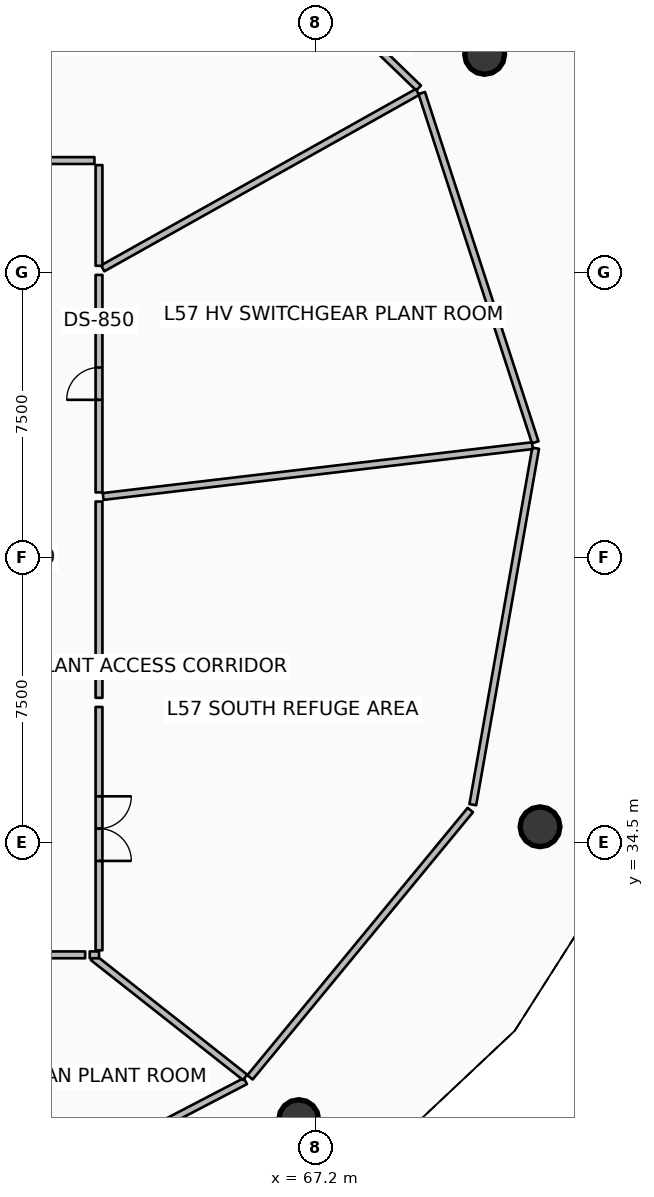
"""IFC4 building model, lengths in metres.
Left out: names, types, materials, properties, quantities, classifications, styles, units other than length and angle.
Written with IfcOpenShell. Run it as: python <this file> out.ifc"""

import sys

from ifc_helpers import new_model, si_unit, direction, frame, frame_2d, origin, origin_2d, place, context, subcontext, project, spatial, rectangle, circle, extrude, element, fill, save


model = new_model("IFC4")
c1 = context("Model", 3, precision=1e-05, world=origin(), true_north=direction((0.0, 1.0)))
c2 = subcontext(c1, "Body", "Model", "MODEL_VIEW")
j1 = project(units=[si_unit("LENGTHUNIT", "METRE"), si_unit("PLANEANGLEUNIT", "RADIAN")], contexts=[c1])
p1 = place(None, origin())
s1 = spatial("IfcSite", under=j1, at=p1, CompositionType="ELEMENT")
p2 = place(p1, origin())
s2 = spatial("IfcBuilding", under=s1, at=p2, CompositionType="ELEMENT")
p3 = place(p2, frame((0.0, 0.0, 225.3)))
s3 = spatial("IfcBuildingStorey", under=s2, at=p3, CompositionType="ELEMENT", Elevation=225.3)
for number, where, z_axis, x_axis in (
    (1, (71.648, 55.243, 0.0), (0.0, 0.0, 1.0), (1.0, 0.0, 0.0)),
    (2, (66.755, 27.215, 0.0), (0.0, 0.0, 1.0), (1.0, 0.0, 0.0)),
    (3, (73.105, 34.92, 0.0), (0.0, 0.0, 1.0), (1.0, 0.0, 0.0)),
):
    element("IfcColumn", number, at=place(p3, frame(where, z_axis=z_axis, x_axis=x_axis)), inside=s3, PredefinedType="COLUMN", context=c2, shape_type="SweptSolid", body=[
        extrude(circle(Radius=0.525, at=origin_2d()), origin(), (0.0, 0.0, 1.0), 6.28),
    ])
p4 = place(p3, frame((69.91, 54.358, 0.0), z_axis=(0.0, 0.0, 1.0), x_axis=(-0.719354198581, 0.694643460334, 0.0)))
e4 = element("IfcWall", 4, at=p4, inside=s3, PredefinedType="PARTITIONING", context=c2, shape_type="SweptSolid", body=[
    extrude(rectangle(XDim=9.524, YDim=0.18, at=frame_2d((4.762, 0.0))), origin(), (0.0, 0.0, 1.0), 2.304),
])
p5 = place(p3, frame((57.96, 24.379, 0.0), z_axis=(0.0, 0.0, 1.0), x_axis=(0.886953337161, 0.461859045271, 0.0)))
e5 = element("IfcWall", 5, at=p5, inside=s3, PredefinedType="PARTITIONING", context=c2, shape_type="SweptSolid", body=[
    extrude(rectangle(XDim=8.334, YDim=0.18, at=frame_2d((4.167, 0.0))), origin(), (0.0, 0.0, 1.0), 2.304),
])
p6 = place(p3, frame((65.474, 28.327, 0.0), z_axis=(0.0, 0.0, 1.0), x_axis=(0.636001991142, 0.771687415514, 0.0)))
e6 = element("IfcWall", 6, at=p6, inside=s3, PredefinedType="PARTITIONING", context=c2, shape_type="SweptSolid", body=[
    extrude(rectangle(XDim=9.115, YDim=0.18, at=frame_2d((4.558, 0.0))), origin(), (0.0, 0.0, 1.0), 2.304),
])
p7 = place(p3, frame((71.336, 35.501, 0.0), z_axis=(0.0, 0.0, 1.0), x_axis=(0.173669808034, 0.98480393875, 0.0)))
e7 = element("IfcWall", 7, at=p7, inside=s3, PredefinedType="PARTITIONING", context=c2, shape_type="SweptSolid", body=[
    extrude(rectangle(XDim=9.524, YDim=0.18, at=frame_2d((4.762, 0.0))), origin(), (0.0, 0.0, 1.0), 2.304),
])
p8 = place(p3, frame((72.979, 45.035, 0.0), z_axis=(0.0, 0.0, 1.0), x_axis=(-0.309041515545, 0.951048548534, 0.0)))
e8 = element("IfcWall", 8, at=p8, inside=s3, PredefinedType="PARTITIONING", context=c2, shape_type="SweptSolid", body=[
    extrude(rectangle(XDim=9.664, YDim=0.18, at=frame_2d((4.832, 0.0))), origin(), (0.0, 0.0, 1.0), 5.273),
])
p9 = place(p3, frame((56.306, 52.536, 0.0), z_axis=(0.0, 0.0, 1.0), x_axis=(0.619085632085, 0.785323487581, 0.0)))
e9 = element("IfcWall", 9, at=p9, inside=s3, PredefinedType="PARTITIONING", context=c2, shape_type="SweptSolid", body=[
    extrude(rectangle(XDim=10.715, YDim=0.18, at=frame_2d((5.357, 0.0))), origin(), (0.0, 0.0, 1.0), 2.304),
])
p10 = place(p3, frame((53.972, 31.55, 0.0), z_axis=(0.0, 0.0, 1.0), x_axis=(1.0, 0.0, 0.0)))
e10 = element("IfcWall", 10, at=p10, inside=s3, PredefinedType="PARTITIONING", context=c2, shape_type="SweptSolid", body=[
    extrude(rectangle(XDim=7.163, YDim=0.18, at=frame_2d((3.582, 0.0))), origin(), (0.0, 0.0, 1.0), 2.304),
])
p11 = place(p10, frame((3.057, 0.0, 0.0)))
e11 = element("IfcOpeningElement", 11, at=p11, cuts=e10, PredefinedType="OPENING", context=c2, shape_type="SweptSolid", body=[
    extrude(rectangle(XDim=1.05, YDim=2.1, at=frame_2d((0.525, 1.05))), frame((0.0, 0.1, 0.0), z_axis=(0.0, -1.0, 0.0), x_axis=(1.0, 0.0, 0.0)), (0.0, 0.0, 1.0), 0.2),
])
p12 = place(p3, frame((61.342, 31.482, 0.0), z_axis=(0.0, 0.0, 1.0), x_axis=(0.785303207868, -0.619111356471, 0.0)))
e12 = element("IfcWall", 12, at=p12, inside=s3, PredefinedType="PARTITIONING", context=c2, shape_type="SweptSolid", body=[
    extrude(rectangle(XDim=5.096, YDim=0.18, at=frame_2d((2.548, 0.0))), origin(), (0.0, 0.0, 1.0), 2.304),
])
p13 = place(p3, frame((61.256, 31.55, 0.0), z_axis=(0.0, 0.0, 1.0), x_axis=(1.0, 0.0, 0.0)))
e13 = element("IfcWall", 13, at=p13, inside=s3, PredefinedType="PARTITIONING", context=c2, shape_type="SweptSolid", body=[
    extrude(rectangle(XDim=0.244, YDim=0.18, at=frame_2d((0.122, 0.0))), origin(), (0.0, 0.0, 1.0), 2.304),
])
p14 = place(p3, frame((61.5, 31.67, 0.0), z_axis=(0.0, 0.0, 1.0), x_axis=(0.0, 1.0, 0.0)))
e14 = element("IfcWall", 14, at=p14, inside=s3, PredefinedType="PARTITIONING", context=c2, shape_type="SweptSolid", body=[
    extrude(rectangle(XDim=6.403, YDim=0.18, at=frame_2d((3.201, 0.0))), origin(), (0.0, 0.0, 1.0), 2.304),
])
p15 = place(p14, frame((2.351, 0.0, 0.0)))
e15 = element("IfcOpeningElement", 15, at=p15, cuts=e14, PredefinedType="OPENING", context=c2, shape_type="SweptSolid", body=[
    extrude(rectangle(XDim=1.7, YDim=2.15, at=frame_2d((0.85, 1.075))), frame((0.0, 0.1, 0.0), z_axis=(0.0, -1.0, 0.0), x_axis=(1.0, 0.0, 0.0)), (0.0, 0.0, 1.0), 0.2),
])
p16 = place(p3, frame((61.5, 38.312, 0.0), z_axis=(0.0, 0.0, 1.0), x_axis=(0.0, 1.0, 0.0)))
e16 = element("IfcWall", 16, at=p16, inside=s3, PredefinedType="PARTITIONING", context=c2, shape_type="SweptSolid", body=[
    extrude(rectangle(XDim=5.165, YDim=0.18, at=frame_2d((2.583, 0.0))), origin(), (0.0, 0.0, 1.0), 2.304),
])
p17 = place(p3, frame((61.609, 43.611, 0.0), z_axis=(0.0, 0.0, 1.0), x_axis=(0.993068014992, 0.117541131527, 0.0)))
e17 = element("IfcWall", 17, at=p17, inside=s3, PredefinedType="PARTITIONING", context=c2, shape_type="SweptSolid", body=[
    extrude(rectangle(XDim=11.374, YDim=0.18, at=frame_2d((5.687, 0.0))), origin(), (0.0, 0.0, 1.0), 5.273),
])
p18 = place(p3, frame((61.5, 43.718, 0.0), z_axis=(0.0, 0.0, 1.0), x_axis=(0.0, 1.0, 0.0)))
e18 = element("IfcWall", 18, at=p18, inside=s3, PredefinedType="PARTITIONING", context=c2, shape_type="SweptSolid", body=[
    extrude(rectangle(XDim=5.723, YDim=0.18, at=frame_2d((2.861, 0.0))), origin(), (0.0, 0.0, 1.0), 5.273),
])
p19 = place(p18, frame((2.436, 0.0, 0.0)))
e19 = element("IfcOpeningElement", 19, at=p19, cuts=e18, PredefinedType="OPENING", context=c2, shape_type="SweptSolid", body=[
    extrude(rectangle(XDim=0.85, YDim=2.06, at=frame_2d((0.425, 1.03))), frame((0.0, 0.1, 0.0), z_axis=(0.0, -1.0, 0.0), x_axis=(1.0, 0.0, 0.0)), (0.0, 0.0, 1.0), 0.2),
])
p20 = place(p3, frame((61.596, 49.614, 0.0), z_axis=(0.0, 0.0, 1.0), x_axis=(0.872495493118, 0.488622159227, 0.0)))
e20 = element("IfcWall", 20, at=p20, inside=s3, PredefinedType="PARTITIONING", context=c2, shape_type="SweptSolid", body=[
    extrude(rectangle(XDim=9.495, YDim=0.18, at=frame_2d((4.748, 0.0))), origin(), (0.0, 0.0, 1.0), 5.273),
])
p21 = place(p3, frame((61.5, 49.68, 0.0), z_axis=(0.0, 0.0, 1.0), x_axis=(0.0, 1.0, 0.0)))
e21 = element("IfcWall", 21, at=p21, inside=s3, PredefinedType="PARTITIONING", context=c2, shape_type="SweptSolid", body=[
    extrude(rectangle(XDim=2.65, YDim=0.18, at=frame_2d((1.325, 0.0))), origin(), (0.0, 0.0, 1.0), 5.273),
])
p22 = place(p3, frame((61.38, 52.45, 0.0), z_axis=(0.0, 0.0, 1.0), x_axis=(-1.0, 0.0, 0.0)))
e22 = element("IfcWall", 22, at=p22, inside=s3, PredefinedType="PARTITIONING", context=c2, shape_type="SweptSolid", body=[
    extrude(rectangle(XDim=5.022, YDim=0.18, at=frame_2d((2.511, 0.0))), origin(), (0.0, 0.0, 1.0), 2.304),
])
p23 = place(p22, frame((2.086, 0.0, 0.0)))
e23 = element("IfcOpeningElement", 23, at=p23, cuts=e22, PredefinedType="OPENING", context=c2, shape_type="SweptSolid", body=[
    extrude(rectangle(XDim=0.85, YDim=2.06, at=frame_2d((0.425, 1.03))), frame((0.0, 0.1, 0.0), z_axis=(0.0, -1.0, 0.0), x_axis=(1.0, 0.0, 0.0)), (0.0, 0.0, 1.0), 0.2),
])
p24 = place(p15, origin())
e24 = element("IfcDoor", 24, at=p24, inside=s3, OperationType="DOUBLE_DOOR_SINGLE_SWING", PredefinedType="DOOR", context=c2, shape_type="SweptSolid", body=[
    extrude(rectangle(XDim=1.7, YDim=2.15, at=frame_2d((0.85, 1.075))), frame((0.0, 0.025, 0.0), z_axis=(0.0, -1.0, 0.0), x_axis=(1.0, 0.0, 0.0)), (0.0, 0.0, 1.0), 0.05),
])
fill(e15, e24)
p25 = place(p19, origin())
e25 = element("IfcDoor", 25, at=p25, inside=s3, OperationType="SINGLE_SWING_LEFT", PredefinedType="DOOR", context=c2, shape_type="SweptSolid", body=[
    extrude(rectangle(XDim=0.85, YDim=2.06, at=frame_2d((0.425, 1.03))), frame((0.0, 0.025, 0.0), z_axis=(0.0, -1.0, 0.0), x_axis=(1.0, 0.0, 0.0)), (0.0, 0.0, 1.0), 0.05),
])
fill(e19, e25)
save(model, sys.argv[1])
